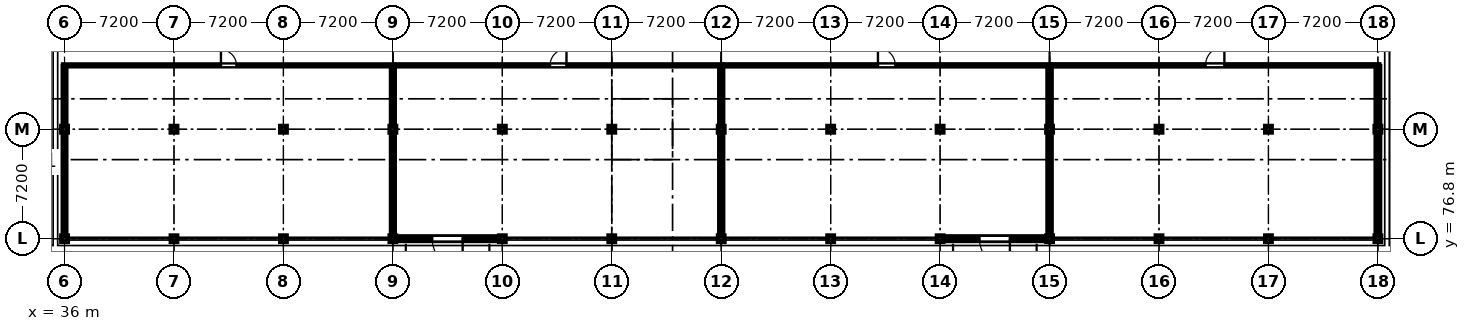
"""IFC4 building model, lengths in metres.
Left out: names, types, materials, properties, quantities, classifications, styles, units other than length and angle.
Written with IfcOpenShell. Run it as: python <this file> out.ifc"""

import sys

from ifc_helpers import new_model, si_unit, direction, frame, frame_2d, origin, origin_2d, place, context, subcontext, project, spatial, rectangle, i_section, extrude, element, fill, save


model = new_model("IFC4")
c1 = context("Model", 3, precision=1e-05, world=origin(), true_north=direction((0.0, 1.0)))
c2 = subcontext(c1, "Body", "Model", "MODEL_VIEW")
j1 = project(units=[si_unit("LENGTHUNIT", "METRE"), si_unit("PLANEANGLEUNIT", "RADIAN")], contexts=[c1])
p1 = place(None, origin())
s1 = spatial("IfcSite", under=j1, at=p1, CompositionType="ELEMENT")
p2 = place(p1, origin())
s2 = spatial("IfcBuilding", under=s1, at=p2, CompositionType="ELEMENT")
p3 = place(p2, origin())
s3 = spatial("IfcBuildingStorey", under=s2, at=p3, CompositionType="ELEMENT", Elevation=0.0)
p4 = place(p3, frame((36.0, 76.8, 0.0), z_axis=(0.0, 0.0, 1.0), x_axis=(1.0, 0.0, 0.0)))
e1 = element("IfcColumn", 1, at=p4, inside=s3, PredefinedType="COLUMN", context=c2, shape_type="SweptSolid", body=[
    extrude(i_section(OverallWidth=0.399, OverallDepth=0.394, WebThickness=0.023, FlangeThickness=0.037, FilletRadius=0.015, at=origin_2d()), origin(), (0.0, 0.0, 1.0), 5.4),
])
p5 = place(p3, frame((36.0, 84.0, 0.0), z_axis=(0.0, 0.0, 1.0), x_axis=(1.0, 0.0, 0.0)))
e2 = element("IfcColumn", 2, at=p5, inside=s3, PredefinedType="COLUMN", context=c2, shape_type="SweptSolid", body=[
    extrude(i_section(OverallWidth=0.404, OverallDepth=0.406, WebThickness=0.027, FlangeThickness=0.044, FilletRadius=0.015, at=origin_2d()), origin(), (0.0, 0.0, 1.0), 5.4),
])
p6 = place(p3, frame((43.2, 76.8, 0.0), z_axis=(0.0, 0.0, 1.0), x_axis=(1.0, 0.0, 0.0)))
e3 = element("IfcColumn", 3, at=p6, inside=s3, PredefinedType="COLUMN", context=c2, shape_type="SweptSolid", body=[
    extrude(i_section(OverallWidth=0.399, OverallDepth=0.394, WebThickness=0.023, FlangeThickness=0.037, FilletRadius=0.015, at=origin_2d()), origin(), (0.0, 0.0, 1.0), 5.4),
])
p7 = place(p3, frame((43.2, 84.0, 0.0), z_axis=(0.0, 0.0, 1.0), x_axis=(1.0, 0.0, 0.0)))
e4 = element("IfcColumn", 4, at=p7, inside=s3, PredefinedType="COLUMN", context=c2, shape_type="SweptSolid", body=[
    extrude(i_section(OverallWidth=0.404, OverallDepth=0.406, WebThickness=0.027, FlangeThickness=0.044, FilletRadius=0.015, at=origin_2d()), origin(), (0.0, 0.0, 1.0), 5.4),
])
p8 = place(p3, frame((50.4, 76.8, 0.0), z_axis=(0.0, 0.0, 1.0), x_axis=(1.0, 0.0, 0.0)))
e5 = element("IfcColumn", 5, at=p8, inside=s3, PredefinedType="COLUMN", context=c2, shape_type="SweptSolid", body=[
    extrude(i_section(OverallWidth=0.399, OverallDepth=0.394, WebThickness=0.023, FlangeThickness=0.037, FilletRadius=0.015, at=origin_2d()), origin(), (0.0, 0.0, 1.0), 5.4),
])
p9 = place(p3, frame((50.4, 84.0, 0.0), z_axis=(0.0, 0.0, 1.0), x_axis=(1.0, 0.0, 0.0)))
e6 = element("IfcColumn", 6, at=p9, inside=s3, PredefinedType="COLUMN", context=c2, shape_type="SweptSolid", body=[
    extrude(i_section(OverallWidth=0.404, OverallDepth=0.406, WebThickness=0.027, FlangeThickness=0.044, FilletRadius=0.015, at=origin_2d()), origin(), (0.0, 0.0, 1.0), 5.4),
])
p10 = place(p3, frame((57.6, 76.8, 0.0), z_axis=(0.0, 0.0, 1.0), x_axis=(1.0, 0.0, 0.0)))
e7 = element("IfcColumn", 7, at=p10, inside=s3, PredefinedType="COLUMN", context=c2, shape_type="SweptSolid", body=[
    extrude(i_section(OverallWidth=0.399, OverallDepth=0.394, WebThickness=0.023, FlangeThickness=0.037, FilletRadius=0.015, at=origin_2d()), origin(), (0.0, 0.0, 1.0), 5.4),
])
p11 = place(p3, frame((57.6, 84.0, 0.0), z_axis=(0.0, 0.0, 1.0), x_axis=(1.0, 0.0, 0.0)))
e8 = element("IfcColumn", 8, at=p11, inside=s3, PredefinedType="COLUMN", context=c2, shape_type="SweptSolid", body=[
    extrude(i_section(OverallWidth=0.404, OverallDepth=0.406, WebThickness=0.027, FlangeThickness=0.044, FilletRadius=0.015, at=origin_2d()), origin(), (0.0, 0.0, 1.0), 5.4),
])
p12 = place(p3, frame((64.8, 76.8, 0.0), z_axis=(0.0, 0.0, 1.0), x_axis=(1.0, 0.0, 0.0)))
e9 = element("IfcColumn", 9, at=p12, inside=s3, PredefinedType="COLUMN", context=c2, shape_type="SweptSolid", body=[
    extrude(i_section(OverallWidth=0.399, OverallDepth=0.394, WebThickness=0.023, FlangeThickness=0.037, FilletRadius=0.015, at=origin_2d()), origin(), (0.0, 0.0, 1.0), 5.4),
])
p13 = place(p3, frame((64.8, 84.0, 0.0), z_axis=(0.0, 0.0, 1.0), x_axis=(1.0, 0.0, 0.0)))
e10 = element("IfcColumn", 10, at=p13, inside=s3, PredefinedType="COLUMN", context=c2, shape_type="SweptSolid", body=[
    extrude(i_section(OverallWidth=0.404, OverallDepth=0.406, WebThickness=0.027, FlangeThickness=0.044, FilletRadius=0.015, at=origin_2d()), origin(), (0.0, 0.0, 1.0), 5.4),
])
p14 = place(p3, frame((72.0, 76.8, 0.0), z_axis=(0.0, 0.0, 1.0), x_axis=(1.0, 0.0, 0.0)))
e11 = element("IfcColumn", 11, at=p14, inside=s3, PredefinedType="COLUMN", context=c2, shape_type="SweptSolid", body=[
    extrude(i_section(OverallWidth=0.399, OverallDepth=0.394, WebThickness=0.023, FlangeThickness=0.037, FilletRadius=0.015, at=origin_2d()), origin(), (0.0, 0.0, 1.0), 5.4),
])
p15 = place(p3, frame((72.0, 84.0, 0.0), z_axis=(0.0, 0.0, 1.0), x_axis=(1.0, 0.0, 0.0)))
e12 = element("IfcColumn", 12, at=p15, inside=s3, PredefinedType="COLUMN", context=c2, shape_type="SweptSolid", body=[
    extrude(i_section(OverallWidth=0.404, OverallDepth=0.406, WebThickness=0.027, FlangeThickness=0.044, FilletRadius=0.015, at=origin_2d()), origin(), (0.0, 0.0, 1.0), 5.4),
])
p16 = place(p3, frame((79.2, 76.8, 0.0), z_axis=(0.0, 0.0, 1.0), x_axis=(1.0, 0.0, 0.0)))
e13 = element("IfcColumn", 13, at=p16, inside=s3, PredefinedType="COLUMN", context=c2, shape_type="SweptSolid", body=[
    extrude(i_section(OverallWidth=0.399, OverallDepth=0.394, WebThickness=0.023, FlangeThickness=0.037, FilletRadius=0.015, at=origin_2d()), origin(), (0.0, 0.0, 1.0), 5.4),
])
p17 = place(p3, frame((79.2, 84.0, 0.0), z_axis=(0.0, 0.0, 1.0), x_axis=(1.0, 0.0, 0.0)))
e14 = element("IfcColumn", 14, at=p17, inside=s3, PredefinedType="COLUMN", context=c2, shape_type="SweptSolid", body=[
    extrude(i_section(OverallWidth=0.404, OverallDepth=0.406, WebThickness=0.027, FlangeThickness=0.044, FilletRadius=0.015, at=origin_2d()), origin(), (0.0, 0.0, 1.0), 5.4),
])
p18 = place(p3, frame((86.4, 76.8, 0.0), z_axis=(0.0, 0.0, 1.0), x_axis=(1.0, 0.0, 0.0)))
e15 = element("IfcColumn", 15, at=p18, inside=s3, PredefinedType="COLUMN", context=c2, shape_type="SweptSolid", body=[
    extrude(i_section(OverallWidth=0.399, OverallDepth=0.394, WebThickness=0.023, FlangeThickness=0.037, FilletRadius=0.015, at=origin_2d()), origin(), (0.0, 0.0, 1.0), 5.4),
])
p19 = place(p3, frame((86.4, 84.0, 0.0), z_axis=(0.0, 0.0, 1.0), x_axis=(1.0, 0.0, 0.0)))
e16 = element("IfcColumn", 16, at=p19, inside=s3, PredefinedType="COLUMN", context=c2, shape_type="SweptSolid", body=[
    extrude(i_section(OverallWidth=0.404, OverallDepth=0.406, WebThickness=0.027, FlangeThickness=0.044, FilletRadius=0.015, at=origin_2d()), origin(), (0.0, 0.0, 1.0), 5.4),
])
p20 = place(p3, frame((93.6, 76.8, 0.0), z_axis=(0.0, 0.0, 1.0), x_axis=(1.0, 0.0, 0.0)))
e17 = element("IfcColumn", 17, at=p20, inside=s3, PredefinedType="COLUMN", context=c2, shape_type="SweptSolid", body=[
    extrude(i_section(OverallWidth=0.399, OverallDepth=0.394, WebThickness=0.023, FlangeThickness=0.037, FilletRadius=0.015, at=origin_2d()), origin(), (0.0, 0.0, 1.0), 5.4),
])
p21 = place(p3, frame((93.6, 84.0, 0.0), z_axis=(0.0, 0.0, 1.0), x_axis=(1.0, 0.0, 0.0)))
e18 = element("IfcColumn", 18, at=p21, inside=s3, PredefinedType="COLUMN", context=c2, shape_type="SweptSolid", body=[
    extrude(i_section(OverallWidth=0.404, OverallDepth=0.406, WebThickness=0.027, FlangeThickness=0.044, FilletRadius=0.015, at=origin_2d()), origin(), (0.0, 0.0, 1.0), 5.4),
])
p22 = place(p3, frame((100.8, 76.8, 0.0), z_axis=(0.0, 0.0, 1.0), x_axis=(1.0, 0.0, 0.0)))
e19 = element("IfcColumn", 19, at=p22, inside=s3, PredefinedType="COLUMN", context=c2, shape_type="SweptSolid", body=[
    extrude(i_section(OverallWidth=0.399, OverallDepth=0.394, WebThickness=0.023, FlangeThickness=0.037, FilletRadius=0.015, at=origin_2d()), origin(), (0.0, 0.0, 1.0), 5.4),
])
p23 = place(p3, frame((100.8, 84.0, 0.0), z_axis=(0.0, 0.0, 1.0), x_axis=(1.0, 0.0, 0.0)))
e20 = element("IfcColumn", 20, at=p23, inside=s3, PredefinedType="COLUMN", context=c2, shape_type="SweptSolid", body=[
    extrude(i_section(OverallWidth=0.404, OverallDepth=0.406, WebThickness=0.027, FlangeThickness=0.044, FilletRadius=0.015, at=origin_2d()), origin(), (0.0, 0.0, 1.0), 5.4),
])
p24 = place(p3, frame((108.0, 76.8, 0.0), z_axis=(0.0, 0.0, 1.0), x_axis=(1.0, 0.0, 0.0)))
e21 = element("IfcColumn", 21, at=p24, inside=s3, PredefinedType="COLUMN", context=c2, shape_type="SweptSolid", body=[
    extrude(i_section(OverallWidth=0.399, OverallDepth=0.394, WebThickness=0.023, FlangeThickness=0.037, FilletRadius=0.015, at=origin_2d()), origin(), (0.0, 0.0, 1.0), 5.4),
])
p25 = place(p3, frame((108.0, 84.0, 0.0), z_axis=(0.0, 0.0, 1.0), x_axis=(1.0, 0.0, 0.0)))
e22 = element("IfcColumn", 22, at=p25, inside=s3, PredefinedType="COLUMN", context=c2, shape_type="SweptSolid", body=[
    extrude(i_section(OverallWidth=0.404, OverallDepth=0.406, WebThickness=0.027, FlangeThickness=0.044, FilletRadius=0.015, at=origin_2d()), origin(), (0.0, 0.0, 1.0), 5.4),
])
p26 = place(p3, frame((115.2, 76.8, 0.0), z_axis=(0.0, 0.0, 1.0), x_axis=(1.0, 0.0, 0.0)))
e23 = element("IfcColumn", 23, at=p26, inside=s3, PredefinedType="COLUMN", context=c2, shape_type="SweptSolid", body=[
    extrude(i_section(OverallWidth=0.399, OverallDepth=0.394, WebThickness=0.023, FlangeThickness=0.037, FilletRadius=0.015, at=origin_2d()), origin(), (0.0, 0.0, 1.0), 5.4),
])
p27 = place(p3, frame((115.2, 84.0, 0.0), z_axis=(0.0, 0.0, 1.0), x_axis=(1.0, 0.0, 0.0)))
e24 = element("IfcColumn", 24, at=p27, inside=s3, PredefinedType="COLUMN", context=c2, shape_type="SweptSolid", body=[
    extrude(i_section(OverallWidth=0.404, OverallDepth=0.406, WebThickness=0.027, FlangeThickness=0.044, FilletRadius=0.015, at=origin_2d()), origin(), (0.0, 0.0, 1.0), 5.4),
])
p28 = place(p3, frame((122.4, 76.8, 0.0), z_axis=(0.0, 0.0, 1.0), x_axis=(1.0, 0.0, 0.0)))
e25 = element("IfcColumn", 25, at=p28, inside=s3, PredefinedType="COLUMN", context=c2, shape_type="SweptSolid", body=[
    extrude(i_section(OverallWidth=0.399, OverallDepth=0.394, WebThickness=0.023, FlangeThickness=0.037, FilletRadius=0.015, at=origin_2d()), origin(), (0.0, 0.0, 1.0), 5.4),
])
p29 = place(p3, frame((122.4, 84.0, 0.0), z_axis=(0.0, 0.0, 1.0), x_axis=(1.0, 0.0, 0.0)))
e26 = element("IfcColumn", 26, at=p29, inside=s3, PredefinedType="COLUMN", context=c2, shape_type="SweptSolid", body=[
    extrude(i_section(OverallWidth=0.404, OverallDepth=0.406, WebThickness=0.027, FlangeThickness=0.044, FilletRadius=0.015, at=origin_2d()), origin(), (0.0, 0.0, 1.0), 5.4),
])
p30 = place(p3, frame((64.593, 76.8, 0.0), z_axis=(0.0, 0.0, 1.0), x_axis=(-1.0, 0.0, 0.0)))
e27 = element("IfcWall", 27, at=p30, inside=s3, PredefinedType="STANDARD", context=c2, shape_type="SweptSolid", body=[
    extrude(rectangle(XDim=6.786, YDim=0.28, at=frame_2d((3.393, 0.0))), origin(), (0.0, 0.0, 1.0), 4.462),
])
p31 = place(p30, frame((2.403, 0.0, 0.0)))
e28 = element("IfcOpeningElement", 28, at=p31, cuts=e27, PredefinedType="OPENING", context=c2, shape_type="SweptSolid", body=[
    extrude(rectangle(XDim=2.0, YDim=2.4, at=frame_2d((1.0, 1.2))), frame((0.0, 0.15, 0.0), z_axis=(0.0, -1.0, 0.0), x_axis=(1.0, 0.0, 0.0)), (0.0, 0.0, 1.0), 0.3),
])
p32 = place(p3, frame((100.593, 76.8, 0.0), z_axis=(0.0, 0.0, 1.0), x_axis=(-1.0, 0.0, 0.0)))
e29 = element("IfcWall", 29, at=p32, inside=s3, PredefinedType="STANDARD", context=c2, shape_type="SweptSolid", body=[
    extrude(rectangle(XDim=6.786, YDim=0.28, at=frame_2d((3.393, 0.0))), origin(), (0.0, 0.0, 1.0), 4.462),
])
p33 = place(p32, frame((2.403, 0.0, 0.0)))
e30 = element("IfcOpeningElement", 30, at=p33, cuts=e29, PredefinedType="OPENING", context=c2, shape_type="SweptSolid", body=[
    extrude(rectangle(XDim=2.0, YDim=2.4, at=frame_2d((1.0, 1.2))), frame((0.0, 0.15, 0.0), z_axis=(0.0, -1.0, 0.0), x_axis=(1.0, 0.0, 0.0)), (0.0, 0.0, 1.0), 0.3),
])
p34 = place(p3, frame((35.92, 88.2, 0.0), z_axis=(0.0, 0.0, 1.0), x_axis=(1.0, 0.0, 0.0)))
e31 = element("IfcWall", 31, at=p34, inside=s3, PredefinedType="PARTITIONING", context=c2, shape_type="SweptSolid", body=[
    extrude(rectangle(XDim=21.76, YDim=0.1, at=frame_2d((10.88, 0.0))), origin(), (0.0, 0.0, 1.0), 4.457),
])
p35 = place(p34, frame((10.37, 0.0, 0.0)))
e32 = element("IfcOpeningElement", 32, at=p35, cuts=e31, PredefinedType="OPENING", context=c2, shape_type="SweptSolid", body=[
    extrude(rectangle(XDim=1.02, YDim=2.16, at=frame_2d((0.51, 1.08))), frame((0.0, 0.06, 0.0), z_axis=(0.0, -1.0, 0.0), x_axis=(1.0, 0.0, 0.0)), (0.0, 0.0, 1.0), 0.12),
])
p36 = place(p34, frame((12.64, 0.0, 0.95)))
e33 = element("IfcOpeningElement", 33, at=p36, cuts=e31, PredefinedType="OPENING", context=c2, shape_type="SweptSolid", body=[
    extrude(rectangle(XDim=1.6, YDim=1.0, at=frame_2d((0.8, 0.5))), frame((0.0, 0.06, 0.0), z_axis=(0.0, -1.0, 0.0), x_axis=(1.0, 0.0, 0.0)), (0.0, 0.0, 1.0), 0.12),
])
p37 = place(p3, frame((57.682, 88.2, 0.0), z_axis=(0.0, 0.0, 1.0), x_axis=(1.0, 0.0, 0.0)))
e34 = element("IfcWall", 34, at=p37, inside=s3, PredefinedType="PARTITIONING", context=c2, shape_type="SweptSolid", body=[
    extrude(rectangle(XDim=21.598, YDim=0.105, at=frame_2d((10.799, 0.0))), origin(), (0.0, 0.0, 1.0), 4.457),
])
p38 = place(p37, frame((10.259, 0.0, 0.0)))
e35 = element("IfcOpeningElement", 35, at=p38, cuts=e34, PredefinedType="OPENING", context=c2, shape_type="SweptSolid", body=[
    extrude(rectangle(XDim=1.08, YDim=2.16, at=frame_2d((0.54, 1.08))), frame((0.0, 0.062, 0.0), z_axis=(0.0, -1.0, 0.0), x_axis=(1.0, 0.0, 0.0)), (0.0, 0.0, 1.0), 0.125),
])
p39 = place(p37, frame((12.589, 0.0, 0.95)))
e36 = element("IfcOpeningElement", 36, at=p39, cuts=e34, PredefinedType="OPENING", context=c2, shape_type="SweptSolid", body=[
    extrude(rectangle(XDim=1.0, YDim=1.15, at=frame_2d((0.5, 0.575))), frame((0.0, 0.062, 0.0), z_axis=(0.0, -1.0, 0.0), x_axis=(1.0, 0.0, 0.0)), (0.0, 0.0, 1.0), 0.125),
])
p40 = place(p3, frame((79.282, 88.2, 0.0), z_axis=(0.0, 0.0, 1.0), x_axis=(1.0, 0.0, 0.0)))
e37 = element("IfcWall", 37, at=p40, inside=s3, PredefinedType="PARTITIONING", context=c2, shape_type="SweptSolid", body=[
    extrude(rectangle(XDim=21.598, YDim=0.11, at=frame_2d((10.799, 0.0))), origin(), (0.0, 0.0, 1.0), 4.457),
])
p41 = place(p40, frame((10.229, 0.0, 0.0)))
e38 = element("IfcOpeningElement", 38, at=p41, cuts=e37, PredefinedType="OPENING", context=c2, shape_type="SweptSolid", body=[
    extrude(rectangle(XDim=1.14, YDim=2.16, at=frame_2d((0.57, 1.08))), frame((0.0, 0.065, 0.0), z_axis=(0.0, -1.0, 0.0), x_axis=(1.0, 0.0, 0.0)), (0.0, 0.0, 1.0), 0.13),
])
p42 = place(p40, frame((12.619, 0.0, 0.95)))
e39 = element("IfcOpeningElement", 39, at=p42, cuts=e37, PredefinedType="OPENING", context=c2, shape_type="SweptSolid", body=[
    extrude(rectangle(XDim=1.25, YDim=1.15, at=frame_2d((0.625, 0.575))), frame((0.0, 0.065, 0.0), z_axis=(0.0, -1.0, 0.0), x_axis=(1.0, 0.0, 0.0)), (0.0, 0.0, 1.0), 0.13),
])
p43 = place(p3, frame((100.882, 88.2, 0.0), z_axis=(0.0, 0.0, 1.0), x_axis=(1.0, 0.0, 0.0)))
e40 = element("IfcWall", 40, at=p43, inside=s3, PredefinedType="PARTITIONING", context=c2, shape_type="SweptSolid", body=[
    extrude(rectangle(XDim=21.598, YDim=0.115, at=frame_2d((10.799, 0.0))), origin(), (0.0, 0.0, 1.0), 4.457),
])
p44 = place(p43, frame((10.179, 0.0, 0.0)))
e41 = element("IfcOpeningElement", 41, at=p44, cuts=e40, PredefinedType="OPENING", context=c2, shape_type="SweptSolid", body=[
    extrude(rectangle(XDim=1.24, YDim=2.16, at=frame_2d((0.62, 1.08))), frame((0.0, 0.067, 0.0), z_axis=(0.0, -1.0, 0.0), x_axis=(1.0, 0.0, 0.0)), (0.0, 0.0, 1.0), 0.135),
])
p45 = place(p43, frame((12.669, 0.0, 0.95)))
e42 = element("IfcOpeningElement", 42, at=p45, cuts=e40, PredefinedType="OPENING", context=c2, shape_type="SweptSolid", body=[
    extrude(rectangle(XDim=1.5, YDim=1.15, at=frame_2d((0.75, 0.575))), frame((0.0, 0.067, 0.0), z_axis=(0.0, -1.0, 0.0), x_axis=(1.0, 0.0, 0.0)), (0.0, 0.0, 1.0), 0.135),
])
p46 = place(p3, frame((36.0, 76.942, 0.0), z_axis=(0.0, 0.0, 1.0), x_axis=(0.0, 1.0, 0.0)))
e43 = element("IfcWall", 43, at=p46, inside=s3, PredefinedType="PARTITIONING", context=c2, shape_type="SweptSolid", body=[
    extrude(rectangle(XDim=11.206, YDim=0.212, at=frame_2d((5.603, 0.0))), origin(), (0.0, 0.0, 1.0), 4.457),
])
p47 = place(p3, frame((57.6, 88.146, 0.0), z_axis=(0.0, 0.0, 1.0), x_axis=(0.0, -1.0, 0.0)))
e44 = element("IfcWall", 44, at=p47, inside=s3, PredefinedType="PARTITIONING", context=c2, shape_type="SweptSolid", body=[
    extrude(rectangle(XDim=11.204, YDim=0.225, at=frame_2d((5.602, 0.0))), origin(), (0.0, 0.0, 1.0), 4.457),
])
p48 = place(p3, frame((79.2, 88.143, 0.0), z_axis=(0.0, 0.0, 1.0), x_axis=(0.0, -1.0, 0.0)))
e45 = element("IfcWall", 45, at=p48, inside=s3, PredefinedType="PARTITIONING", context=c2, shape_type="SweptSolid", body=[
    extrude(rectangle(XDim=11.201, YDim=0.235, at=frame_2d((5.601, 0.0))), origin(), (0.0, 0.0, 1.0), 4.457),
])
p49 = place(p3, frame((100.8, 88.14, 0.0), z_axis=(0.0, 0.0, 1.0), x_axis=(0.0, -1.0, 0.0)))
e46 = element("IfcWall", 46, at=p49, inside=s3, PredefinedType="PARTITIONING", context=c2, shape_type="SweptSolid", body=[
    extrude(rectangle(XDim=11.198, YDim=0.25, at=frame_2d((5.599, 0.0))), origin(), (0.0, 0.0, 1.0), 4.457),
])
p50 = place(p3, frame((122.4, 88.14, 0.0), z_axis=(0.0, 0.0, 1.0), x_axis=(0.0, -1.0, 0.0)))
e47 = element("IfcWall", 47, at=p50, inside=s3, PredefinedType="PARTITIONING", context=c2, shape_type="SweptSolid", body=[
    extrude(rectangle(XDim=11.198, YDim=0.27, at=frame_2d((5.599, 0.0))), origin(), (0.0, 0.0, 1.0), 4.457),
])
p51 = place(p31, origin())
e48 = element("IfcDoor", 48, at=p51, inside=s3, OperationType="SINGLE_SWING_LEFT", PredefinedType="DOOR", context=c2, shape_type="SweptSolid", body=[
    extrude(rectangle(XDim=2.0, YDim=2.4, at=frame_2d((1.0, 1.2))), frame((0.0, 0.025, 0.0), z_axis=(0.0, -1.0, 0.0), x_axis=(1.0, 0.0, 0.0)), (0.0, 0.0, 1.0), 0.05),
])
fill(e28, e48)
p52 = place(p33, origin())
e49 = element("IfcDoor", 49, at=p52, inside=s3, OperationType="SINGLE_SWING_LEFT", PredefinedType="DOOR", context=c2, shape_type="SweptSolid", body=[
    extrude(rectangle(XDim=2.0, YDim=2.4, at=frame_2d((1.0, 1.2))), frame((0.0, 0.025, 0.0), z_axis=(0.0, -1.0, 0.0), x_axis=(1.0, 0.0, 0.0)), (0.0, 0.0, 1.0), 0.05),
])
fill(e30, e49)
p53 = place(p35, origin())
e50 = element("IfcDoor", 50, at=p53, inside=s3, OperationType="SINGLE_SWING_LEFT", PredefinedType="DOOR", context=c2, shape_type="SweptSolid", body=[
    extrude(rectangle(XDim=1.02, YDim=2.16, at=frame_2d((0.51, 1.08))), frame((0.0, 0.025, 0.0), z_axis=(0.0, -1.0, 0.0), x_axis=(1.0, 0.0, 0.0)), (0.0, 0.0, 1.0), 0.05),
])
fill(e32, e50)
p54 = place(p36, origin())
e51 = element("IfcWindow", 51, at=p54, inside=s3, PartitioningType="SINGLE_PANEL", PredefinedType="WINDOW", context=c2, shape_type="SweptSolid", body=[
    extrude(rectangle(XDim=1.6, YDim=1.0, at=frame_2d((0.8, 0.5))), frame((0.0, 0.03, 0.0), z_axis=(0.0, -1.0, 0.0), x_axis=(1.0, 0.0, 0.0)), (0.0, 0.0, 1.0), 0.06),
])
fill(e33, e51)
p55 = place(p38, origin())
e52 = element("IfcDoor", 52, at=p55, inside=s3, OperationType="SINGLE_SWING_RIGHT", PredefinedType="DOOR", context=c2, shape_type="SweptSolid", body=[
    extrude(rectangle(XDim=1.08, YDim=2.16, at=frame_2d((0.54, 1.08))), frame((0.0, 0.025, 0.0), z_axis=(0.0, -1.0, 0.0), x_axis=(1.0, 0.0, 0.0)), (0.0, 0.0, 1.0), 0.05),
])
fill(e35, e52)
p56 = place(p39, origin())
e53 = element("IfcWindow", 53, at=p56, inside=s3, PartitioningType="SINGLE_PANEL", PredefinedType="WINDOW", context=c2, shape_type="SweptSolid", body=[
    extrude(rectangle(XDim=1.0, YDim=1.15, at=frame_2d((0.5, 0.575))), frame((0.0, 0.03, 0.0), z_axis=(0.0, -1.0, 0.0), x_axis=(1.0, 0.0, 0.0)), (0.0, 0.0, 1.0), 0.06),
])
fill(e36, e53)
p57 = place(p41, origin())
e54 = element("IfcDoor", 54, at=p57, inside=s3, OperationType="SINGLE_SWING_LEFT", PredefinedType="DOOR", context=c2, shape_type="SweptSolid", body=[
    extrude(rectangle(XDim=1.14, YDim=2.16, at=frame_2d((0.57, 1.08))), frame((0.0, 0.025, 0.0), z_axis=(0.0, -1.0, 0.0), x_axis=(1.0, 0.0, 0.0)), (0.0, 0.0, 1.0), 0.05),
])
fill(e38, e54)
p58 = place(p42, origin())
e55 = element("IfcWindow", 55, at=p58, inside=s3, PartitioningType="SINGLE_PANEL", PredefinedType="WINDOW", context=c2, shape_type="SweptSolid", body=[
    extrude(rectangle(XDim=1.25, YDim=1.15, at=frame_2d((0.625, 0.575))), frame((0.0, 0.03, 0.0), z_axis=(0.0, -1.0, 0.0), x_axis=(1.0, 0.0, 0.0)), (0.0, 0.0, 1.0), 0.06),
])
fill(e39, e55)
p59 = place(p44, origin())
e56 = element("IfcDoor", 56, at=p59, inside=s3, OperationType="SINGLE_SWING_RIGHT", PredefinedType="DOOR", context=c2, shape_type="SweptSolid", body=[
    extrude(rectangle(XDim=1.24, YDim=2.16, at=frame_2d((0.62, 1.08))), frame((0.0, 0.025, 0.0), z_axis=(0.0, -1.0, 0.0), x_axis=(1.0, 0.0, 0.0)), (0.0, 0.0, 1.0), 0.05),
])
fill(e41, e56)
p60 = place(p45, origin())
e57 = element("IfcWindow", 57, at=p60, inside=s3, PartitioningType="SINGLE_PANEL", PredefinedType="WINDOW", context=c2, shape_type="SweptSolid", body=[
    extrude(rectangle(XDim=1.5, YDim=1.15, at=frame_2d((0.75, 0.575))), frame((0.0, 0.03, 0.0), z_axis=(0.0, -1.0, 0.0), x_axis=(1.0, 0.0, 0.0)), (0.0, 0.0, 1.0), 0.06),
])
fill(e42, e57)
save(model, sys.argv[1])
